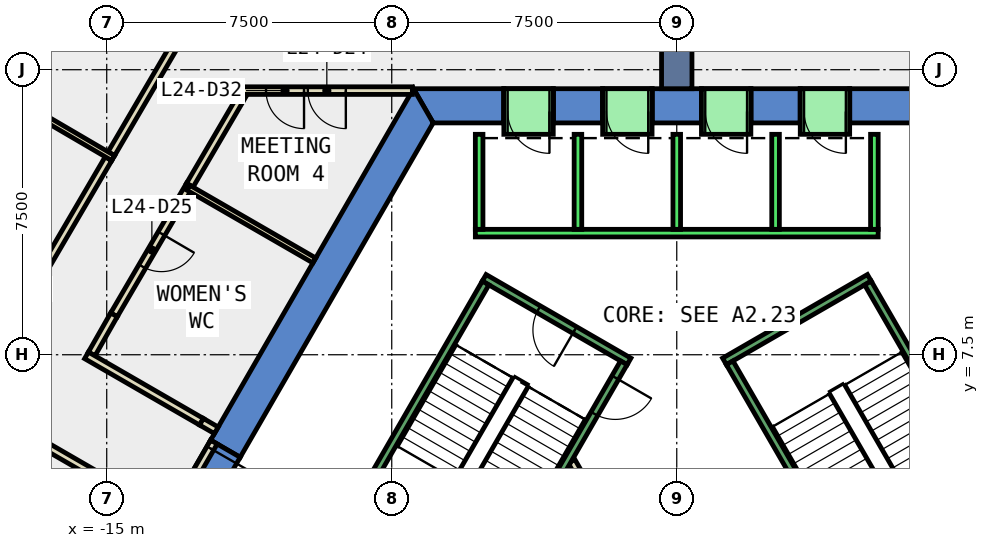
"""IFC4 building model, lengths in metres.
Left out: names, types, materials, properties, quantities, classifications, styles, units other than length and angle.
Written with IfcOpenShell. Run it as: python <this file> out.ifc"""

import sys

from ifc_helpers import new_model, si_unit, direction, frame, frame_2d, origin, place, context, subcontext, project, spatial, polyline, rectangle, outline, extrude, element, fill, save


model = new_model("IFC4")
c1 = context("Model", 3, precision=1e-05, world=origin(), true_north=direction((0.0, 1.0)))
c2 = subcontext(c1, "Body", "Model", "MODEL_VIEW")
j1 = project(units=[si_unit("LENGTHUNIT", "METRE"), si_unit("PLANEANGLEUNIT", "RADIAN")], contexts=[c1])
p1 = place(None, origin())
s1 = spatial("IfcSite", under=j1, at=p1, CompositionType="ELEMENT")
p2 = place(p1, origin())
s2 = spatial("IfcBuilding", under=s1, at=p2, CompositionType="ELEMENT")
p3 = place(p2, frame((0.0, 0.0, 111.8)))
s3 = spatial("IfcBuildingStorey", under=s2, at=p3, CompositionType="ELEMENT", Elevation=111.8)
p4 = place(p3, frame((0.0, 0.0, -0.4)))
e1 = element("IfcWall", 1, at=p4, inside=s3, PredefinedType="SHEAR", context=c2, shape_type="SweptSolid", body=[
    extrude(outline(polyline([(4.55, 14.5), (4.55, 13.6), (6.409, 13.6), (6.928, 14.5), (4.55, 14.5)])), origin(), (0.0, 0.0, 1.0), 4.2),
])
p5 = place(p3, frame((0.0, 0.0, -0.4)))
e2 = element("IfcWall", 2, at=p5, inside=s3, PredefinedType="SHEAR", context=c2, shape_type="SweptSolid", body=[
    extrude(outline(polyline([(1.95, 14.5), (1.95, 13.6), (3.25, 13.6), (3.25, 14.5), (1.95, 14.5)])), origin(), (0.0, 0.0, 1.0), 4.2),
])
p6 = place(p3, frame((0.0, 0.0, -0.4)))
e3 = element("IfcWall", 3, at=p6, inside=s3, PredefinedType="SHEAR", context=c2, shape_type="SweptSolid", body=[
    extrude(outline(polyline([(-0.65, 14.5), (-0.65, 13.6), (0.65, 13.6), (0.65, 14.5), (-0.65, 14.5)])), origin(), (0.0, 0.0, 1.0), 4.2),
])
p7 = place(p3, frame((0.0, 0.0, -0.4)))
e4 = element("IfcWall", 4, at=p7, inside=s3, PredefinedType="SHEAR", context=c2, shape_type="SweptSolid", body=[
    extrude(outline(polyline([(-3.25, 14.5), (-3.25, 13.6), (-1.95, 13.6), (-1.95, 14.5), (-3.25, 14.5)])), origin(), (0.0, 0.0, 1.0), 4.2),
])
p8 = place(p3, frame((0.0, 0.0, -0.4)))
e5 = element("IfcWall", 5, at=p8, inside=s3, PredefinedType="SHEAR", context=c2, shape_type="SweptSolid", body=[
    extrude(outline(polyline([(-4.55, 13.6), (-4.55, 14.5), (-6.928, 14.5), (-6.409, 13.6), (-4.55, 13.6)])), origin(), (0.0, 0.0, 1.0), 4.2),
])
p9 = place(p3, frame((0.0, 0.0, 3.6)))
e6 = element("IfcWall", 6, at=p9, inside=s3, PredefinedType="SHEAR", context=c2, shape_type="SweptSolid", body=[
    extrude(outline(polyline([(3.25, 14.5), (3.25, 13.6), (4.55, 13.6), (4.55, 14.5), (3.25, 14.5)])), origin(), (0.0, 0.0, 1.0), 0.2),
])
p10 = place(p3, frame((0.0, 0.0, 3.6)))
e7 = element("IfcWall", 7, at=p10, inside=s3, PredefinedType="SHEAR", context=c2, shape_type="SweptSolid", body=[
    extrude(outline(polyline([(0.65, 14.5), (0.65, 13.6), (1.95, 13.6), (1.95, 14.5), (0.65, 14.5)])), origin(), (0.0, 0.0, 1.0), 0.2),
])
p11 = place(p3, frame((0.0, 0.0, 3.6)))
e8 = element("IfcWall", 8, at=p11, inside=s3, PredefinedType="SHEAR", context=c2, shape_type="SweptSolid", body=[
    extrude(outline(polyline([(-1.95, 14.5), (-1.95, 13.6), (-0.65, 13.6), (-0.65, 14.5), (-1.95, 14.5)])), origin(), (0.0, 0.0, 1.0), 0.2),
])
p12 = place(p3, frame((0.0, 0.0, 3.6)))
e9 = element("IfcWall", 9, at=p12, inside=s3, PredefinedType="SHEAR", context=c2, shape_type="SweptSolid", body=[
    extrude(outline(polyline([(-4.55, 14.5), (-4.55, 13.6), (-3.25, 13.6), (-3.25, 14.5), (-4.55, 14.5)])), origin(), (0.0, 0.0, 1.0), 0.2),
])
p13 = place(p3, frame((0.0, 0.0, -0.4)))
e10 = element("IfcWall", 10, at=p13, inside=s3, PredefinedType="SHEAR", context=c2, shape_type="SweptSolid", body=[
    extrude(outline(polyline([(-12.267, 5.252), (-11.488, 4.802), (-6.409, 13.6), (-6.928, 14.5), (-12.267, 5.252)])), origin(), (0.0, 0.0, 1.0), 4.2),
])
p14 = place(p3, frame((0.0, 0.0, 3.6)))
e11 = element("IfcWall", 11, at=p14, inside=s3, PredefinedType="SHEAR", context=c2, shape_type="SweptSolid", body=[
    extrude(outline(polyline([(-13.267, 3.52), (-12.488, 3.07), (-11.488, 4.802), (-12.267, 5.252), (-13.267, 3.52)])), origin(), (0.0, 0.0, 1.0), 0.2),
])
p15 = place(p3, frame((0.0, 14.5, -0.4), z_axis=(0.0, 0.0, 1.0), x_axis=(0.0, 1.0, 0.0)))
e12 = element("IfcWall", 12, at=p15, inside=s3, PredefinedType="SHEAR", context=c2, shape_type="SweptSolid", body=[
    extrude(rectangle(XDim=9.0, YDim=0.8, at=frame_2d((4.5, 0.0))), origin(), (0.0, 0.0, 1.0), 4.2),
])
p16 = place(p3, frame((-11.409, 14.364, 0.0), z_axis=(0.0, 0.0, 1.0), x_axis=(-0.504846343003, -0.863209227219, 0.0)))
e13 = element("IfcWall", 13, at=p16, inside=s3, PredefinedType="PARTITIONING", context=c2, shape_type="SweptSolid", body=[
    extrude(rectangle(XDim=2.785, YDim=0.2, at=frame_2d((1.393, 0.0))), origin(), (0.0, 0.0, 1.0), 3.8),
])
p17 = place(p3, frame((-12.815, 11.96, 0.0), z_axis=(0.0, 0.0, 1.0), x_axis=(-0.5048198861, -0.863224699946, 0.0)))
e14 = element("IfcWall", 14, at=p17, inside=s3, PredefinedType="PARTITIONING", context=c2, shape_type="SweptSolid", body=[
    extrude(rectangle(XDim=3.95, YDim=0.2, at=frame_2d((1.975, 0.0))), origin(), (0.0, 0.0, 1.0), 3.8),
])
p18 = place(p17, frame((1.475, 0.0, 0.0)))
e15 = element("IfcOpeningElement", 15, at=p18, cuts=e14, PredefinedType="OPENING", context=c2, shape_type="SweptSolid", body=[
    extrude(rectangle(XDim=1.0, YDim=2.1, at=frame_2d((0.5, 1.05))), frame((0.0, 0.11, 0.0), z_axis=(0.0, -1.0, 0.0), x_axis=(1.0, 0.0, 0.0)), (0.0, 0.0, 1.0), 0.22),
])
p19 = place(p3, frame((-14.809, 8.55, 0.0), z_axis=(0.0, 0.0, 1.0), x_axis=(-0.495074026382, -0.868850797549, 0.0)))
e16 = element("IfcWall", 16, at=p19, inside=s3, PredefinedType="PARTITIONING", context=c2, shape_type="SweptSolid", body=[
    extrude(rectangle(XDim=1.186, YDim=0.2, at=frame_2d((0.593, 0.0))), origin(), (0.0, 0.0, 1.0), 3.8),
])
p20 = place(p3, frame((-15.532, 7.484, 0.0), z_axis=(0.0, 0.0, 1.0), x_axis=(0.866045954906, -0.499964402723, 0.0)))
e17 = element("IfcWall", 17, at=p20, inside=s3, PredefinedType="PARTITIONING", context=c2, shape_type="SweptSolid", body=[
    extrude(rectangle(XDim=3.494, YDim=0.2, at=frame_2d((1.747, 0.0))), origin(), (0.0, 0.0, 1.0), 3.8),
])
p21 = place(p3, frame((-14.879, 12.789, 0.0), z_axis=(0.0, 0.0, 1.0), x_axis=(0.504763220102, 0.863257836126, 0.0)))
e18 = element("IfcWall", 18, at=p21, inside=s3, PredefinedType="PARTITIONING", context=c2, shape_type="SweptSolid", body=[
    extrude(rectangle(XDim=3.487, YDim=0.2, at=frame_2d((1.743, 0.0))), origin(), (0.0, 0.0, 1.0), 3.8),
])
p22 = place(p3, frame((-16.714, 9.65, 0.0), z_axis=(0.0, 0.0, 1.0), x_axis=(0.504885284202, 0.863186451351, 0.0)))
e19 = element("IfcWall", 19, at=p22, inside=s3, PredefinedType="PARTITIONING", context=c2, shape_type="SweptSolid", body=[
    extrude(rectangle(XDim=3.486, YDim=0.2, at=frame_2d((1.743, 0.0))), origin(), (0.0, 0.0, 1.0), 3.8),
])
p23 = place(p3, frame((-9.537, 9.981, 0.0), z_axis=(0.0, 0.0, 1.0), x_axis=(-0.866068787954, 0.499924848885, 0.0)))
e20 = element("IfcWall", 20, at=p23, inside=s3, PredefinedType="PARTITIONING", context=c2, shape_type="SweptSolid", body=[
    extrude(rectangle(XDim=3.829, YDim=0.15, at=frame_2d((1.914, 0.0))), origin(), (0.0, 0.0, 1.0), 3.8),
])
p24 = place(p3, frame((-6.957, 14.45, 0.0), z_axis=(0.0, 0.0, 1.0), x_axis=(-1.0, 0.0, 0.0)))
e21 = element("IfcWall", 21, at=p24, inside=s3, PredefinedType="PARTITIONING", context=c2, shape_type="SweptSolid", body=[
    extrude(rectangle(XDim=4.502, YDim=0.2, at=frame_2d((2.251, 0.0))), origin(), (0.0, 0.0, 1.0), 3.8),
])
p25 = place(p24, frame((1.751, 0.0, 0.0)))
e22 = element("IfcOpeningElement", 22, at=p25, cuts=e21, PredefinedType="OPENING", context=c2, shape_type="SweptSolid", body=[
    extrude(rectangle(XDim=1.0, YDim=2.1, at=frame_2d((0.5, 1.05))), frame((0.0, 0.11, 0.0), z_axis=(0.0, -1.0, 0.0), x_axis=(1.0, 0.0, 0.0)), (0.0, 0.0, 1.0), 0.22),
])
p26 = place(p24, frame((2.851, 0.0, 0.0)))
e23 = element("IfcOpeningElement", 23, at=p26, cuts=e21, PredefinedType="OPENING", context=c2, shape_type="SweptSolid", body=[
    extrude(rectangle(XDim=1.0, YDim=2.1, at=frame_2d((0.5, 1.05))), frame((0.0, 0.11, 0.0), z_axis=(0.0, -1.0, 0.0), x_axis=(1.0, 0.0, 0.0)), (0.0, 0.0, 1.0), 0.22),
])
p27 = place(p3, frame((-2.771, 4.7, 0.0), z_axis=(0.0, 0.0, 1.0), x_axis=(0.499969479948, -0.866043023828, 0.0)))
e24 = element("IfcWall", 24, at=p27, inside=s3, PredefinedType="PARTITIONING", context=c2, shape_type="SweptSolid", body=[
    extrude(rectangle(XDim=4.99, YDim=0.2, at=frame_2d((2.495, 0.0))), origin(), (0.0, 0.0, 1.0), 3.8),
])
p28 = place(p27, frame((1.945, 0.0, 0.0)))
e25 = element("IfcOpeningElement", 25, at=p28, cuts=e24, PredefinedType="OPENING", context=c2, shape_type="SweptSolid", body=[
    extrude(rectangle(XDim=1.0, YDim=2.1, at=frame_2d((0.5, 1.05))), frame((0.0, 0.11, 0.0), z_axis=(0.0, -1.0, 0.0), x_axis=(1.0, 0.0, 0.0)), (0.0, 0.0, 1.0), 0.22),
])
p29 = place(p3, frame((-14.83, 12.674, 0.0), z_axis=(0.0, 0.0, 1.0), x_axis=(-0.863237916953, 0.504797284794, 0.0)))
e26 = element("IfcWall", 26, at=p29, inside=s3, PredefinedType="PARTITIONING", context=c2, shape_type="SweptSolid", body=[
    extrude(rectangle(XDim=7.7, YDim=0.15, at=frame_2d((3.85, 0.0))), origin(), (0.0, 0.0, 1.0), 3.8),
])
p30 = place(p3, frame((-12.18, 5.202, 0.0), z_axis=(0.0, 0.0, 1.0), x_axis=(-0.50002537861, -0.866010750942, 0.0)))
e27 = element("IfcWall", 27, at=p30, inside=s3, PredefinedType="PARTITIONING", context=c2, shape_type="SweptSolid", body=[
    extrude(rectangle(XDim=2.0, YDim=0.2, at=frame_2d((1.0, 0.0))), origin(), (0.0, 0.0, 1.0), 2.4),
])
p31 = place(p30, frame((0.19, 0.0, 0.0)))
e28 = element("IfcOpeningElement", 28, at=p31, cuts=e27, PredefinedType="OPENING", context=c2, shape_type="SweptSolid", body=[
    extrude(rectangle(XDim=1.8, YDim=2.1, at=frame_2d((0.9, 1.05))), frame((0.0, 0.11, 0.0), z_axis=(0.0, -1.0, 0.0), x_axis=(1.0, 0.0, 0.0)), (0.0, 0.0, 1.0), 0.22),
])
p32 = place(p3, frame((-12.506, 5.737, 0.0), z_axis=(0.0, 0.0, 1.0), x_axis=(0.865624510465, -0.500693725627, 0.0)))
e29 = element("IfcWall", 29, at=p32, inside=s3, PredefinedType="PARTITIONING", context=c2, shape_type="SweptSolid", body=[
    extrude(rectangle(XDim=0.449, YDim=0.2, at=frame_2d((0.225, 0.0))), origin(), (0.0, 0.0, 1.0), 2.4),
])
p33 = place(p3, frame((-13.807, 3.485, 0.0), z_axis=(0.0, 0.0, 1.0), x_axis=(-0.865984597717, 0.500070671522, 0.0)))
e30 = element("IfcWall", 30, at=p33, inside=s3, PredefinedType="PARTITIONING", context=c2, shape_type="SweptSolid", body=[
    extrude(rectangle(XDim=3.479, YDim=0.2, at=frame_2d((1.74, 0.0))), origin(), (0.0, 0.0, 1.0), 3.8),
])
p34 = place(p3, frame((5.3, 10.7, 0.0), z_axis=(0.0, 0.0, 1.0), x_axis=(-1.0, 0.0, 0.0)))
e31 = element("IfcWall", 31, at=p34, inside=s3, PredefinedType="STANDARD", context=c2, shape_type="SweptSolid", body=[
    extrude(rectangle(XDim=10.6, YDim=0.2, at=frame_2d((5.3, 0.0))), origin(), (0.0, 0.0, 1.0), 3.8),
])
for number, where, z_axis, x_axis in (
    (32, (5.2, 10.8, 0.0), (0.0, 0.0, 1.0), (0.0, 1.0, 0.0)),
    (33, (2.6, 10.8, 0.0), (0.0, 0.0, 1.0), (0.0, 1.0, 0.0)),
    (34, (0.0, 10.8, 0.0), (0.0, 0.0, 1.0), (0.0, 1.0, 0.0)),
    (35, (-2.6, 10.8, 0.0), (0.0, 0.0, 1.0), (0.0, 1.0, 0.0)),
    (36, (-5.2, 10.8, 0.0), (0.0, 0.0, 1.0), (0.0, 1.0, 0.0)),
):
    element("IfcWall", number, at=place(p3, frame(where, z_axis=z_axis, x_axis=x_axis)), inside=s3, PredefinedType="STANDARD", context=c2, shape_type="SweptSolid", body=[
        extrude(rectangle(XDim=2.5, YDim=0.2, at=frame_2d((1.25, 0.0))), origin(), (0.0, 0.0, 1.0), 3.8),
    ])
p35 = place(p3, frame((4.55, 13.9, 0.0), z_axis=(0.0, 0.0, 1.0), x_axis=(-1.0, 0.0, 0.0)))
e37 = element("IfcWall", 37, at=p35, inside=s3, PredefinedType="STANDARD", context=c2, shape_type="SweptSolid", body=[
    extrude(rectangle(XDim=1.3, YDim=1.2, at=frame_2d((0.65, 0.0))), origin(), (0.0, 0.0, 1.0), 2.4),
])
p36 = place(p35, frame((0.1, 0.0, 0.0)))
e38 = element("IfcOpeningElement", 38, at=p36, cuts=e37, PredefinedType="OPENING", context=c2, shape_type="SweptSolid", body=[
    extrude(rectangle(XDim=1.1, YDim=2.3, at=frame_2d((0.55, 1.15))), frame((0.0, 0.61, 0.0), z_axis=(0.0, -1.0, 0.0), x_axis=(1.0, 0.0, 0.0)), (0.0, 0.0, 1.0), 1.22),
])
p37 = place(p3, frame((1.95, 13.9, 0.0), z_axis=(0.0, 0.0, 1.0), x_axis=(-1.0, 0.0, 0.0)))
e39 = element("IfcWall", 39, at=p37, inside=s3, PredefinedType="STANDARD", context=c2, shape_type="SweptSolid", body=[
    extrude(rectangle(XDim=1.3, YDim=1.2, at=frame_2d((0.65, 0.0))), origin(), (0.0, 0.0, 1.0), 2.4),
])
p38 = place(p37, frame((0.1, 0.0, 0.0)))
e40 = element("IfcOpeningElement", 40, at=p38, cuts=e39, PredefinedType="OPENING", context=c2, shape_type="SweptSolid", body=[
    extrude(rectangle(XDim=1.1, YDim=2.3, at=frame_2d((0.55, 1.15))), frame((0.0, 0.61, 0.0), z_axis=(0.0, -1.0, 0.0), x_axis=(1.0, 0.0, 0.0)), (0.0, 0.0, 1.0), 1.22),
])
p39 = place(p3, frame((-0.65, 13.9, 0.0), z_axis=(0.0, 0.0, 1.0), x_axis=(-1.0, 0.0, 0.0)))
e41 = element("IfcWall", 41, at=p39, inside=s3, PredefinedType="STANDARD", context=c2, shape_type="SweptSolid", body=[
    extrude(rectangle(XDim=1.3, YDim=1.2, at=frame_2d((0.65, 0.0))), origin(), (0.0, 0.0, 1.0), 2.4),
])
p40 = place(p39, frame((0.1, 0.0, 0.0)))
e42 = element("IfcOpeningElement", 42, at=p40, cuts=e41, PredefinedType="OPENING", context=c2, shape_type="SweptSolid", body=[
    extrude(rectangle(XDim=1.1, YDim=2.3, at=frame_2d((0.55, 1.15))), frame((0.0, 0.61, 0.0), z_axis=(0.0, -1.0, 0.0), x_axis=(1.0, 0.0, 0.0)), (0.0, 0.0, 1.0), 1.22),
])
p41 = place(p3, frame((-3.25, 13.9, 0.0), z_axis=(0.0, 0.0, 1.0), x_axis=(-1.0, 0.0, 0.0)))
e43 = element("IfcWall", 43, at=p41, inside=s3, PredefinedType="STANDARD", context=c2, shape_type="SweptSolid", body=[
    extrude(rectangle(XDim=1.3, YDim=1.2, at=frame_2d((0.65, 0.0))), origin(), (0.0, 0.0, 1.0), 2.4),
])
p42 = place(p41, frame((0.1, 0.0, 0.0)))
e44 = element("IfcOpeningElement", 44, at=p42, cuts=e43, PredefinedType="OPENING", context=c2, shape_type="SweptSolid", body=[
    extrude(rectangle(XDim=1.1, YDim=2.3, at=frame_2d((0.55, 1.15))), frame((0.0, 0.61, 0.0), z_axis=(0.0, -1.0, 0.0), x_axis=(1.0, 0.0, 0.0)), (0.0, 0.0, 1.0), 1.22),
])
p43 = place(p3, frame((1.256, 7.324, 0.0), z_axis=(0.0, 0.0, 1.0), x_axis=(0.866046073146, 0.499964197906, 0.0)))
e45 = element("IfcWall", 45, at=p43, inside=s3, PredefinedType="STANDARD", context=c2, shape_type="SweptSolid", body=[
    extrude(rectangle(XDim=4.4, YDim=0.2, at=frame_2d((2.2, 0.0))), origin(), (0.0, 0.0, 1.0), 3.8),
])
p44 = place(p3, frame((4.843, 1.312, 0.0), z_axis=(0.0, 0.0, 1.0), x_axis=(-0.499963383562, 0.866046543262, 0.0)))
e46 = element("IfcWall", 46, at=p44, inside=s3, PredefinedType="STANDARD", context=c2, shape_type="SweptSolid", body=[
    extrude(rectangle(XDim=6.9, YDim=0.2, at=frame_2d((3.45, 0.0))), origin(), (0.0, 0.0, 1.0), 3.8),
])
p45 = place(p44, frame((0.45, 0.0, 0.0)))
e47 = element("IfcOpeningElement", 47, at=p45, cuts=e46, PredefinedType="OPENING", context=c2, shape_type="SweptSolid", body=[
    extrude(rectangle(XDim=1.1, YDim=2.2, at=frame_2d((0.55, 1.1))), frame((0.0, 0.11, 0.0), z_axis=(0.0, -1.0, 0.0), x_axis=(1.0, 0.0, 0.0)), (0.0, 0.0, 1.0), 0.22),
])
p46 = place(p3, frame((8.48, 3.412, 0.0), z_axis=(0.0, 0.0, 1.0), x_axis=(-0.499978703459, 0.866037698999, 0.0)))
e48 = element("IfcWall", 48, at=p46, inside=s3, PredefinedType="STANDARD", context=c2, shape_type="SweptSolid", body=[
    extrude(rectangle(XDim=6.9, YDim=0.2, at=frame_2d((3.45, 0.0))), origin(), (0.0, 0.0, 1.0), 3.8),
])
p47 = place(p3, frame((-1.256, 7.324, 0.0), z_axis=(0.0, 0.0, 1.0), x_axis=(-0.866046073146, 0.499964197906, 0.0)))
e49 = element("IfcWall", 49, at=p47, inside=s3, PredefinedType="STANDARD", context=c2, shape_type="SweptSolid", body=[
    extrude(rectangle(XDim=4.4, YDim=0.2, at=frame_2d((2.2, 0.0))), origin(), (0.0, 0.0, 1.0), 3.8),
])
p48 = place(p47, frame((1.65, 0.0, 0.0)))
e50 = element("IfcOpeningElement", 50, at=p48, cuts=e49, PredefinedType="OPENING", context=c2, shape_type="SweptSolid", body=[
    extrude(rectangle(XDim=1.1, YDim=2.2, at=frame_2d((0.55, 1.1))), frame((0.0, 0.11, 0.0), z_axis=(0.0, -1.0, 0.0), x_axis=(1.0, 0.0, 0.0)), (0.0, 0.0, 1.0), 0.22),
])
p49 = place(p3, frame((-1.393, 7.288, 0.0), z_axis=(0.0, 0.0, 1.0), x_axis=(-0.499963383562, -0.866046543262, 0.0)))
e51 = element("IfcWall", 51, at=p49, inside=s3, PredefinedType="STANDARD", context=c2, shape_type="SweptSolid", body=[
    extrude(rectangle(XDim=6.9, YDim=0.2, at=frame_2d((3.45, 0.0))), origin(), (0.0, 0.0, 1.0), 3.8),
])
p50 = place(p49, frame((0.45, 0.0, 0.0)))
e52 = element("IfcOpeningElement", 52, at=p50, cuts=e51, PredefinedType="OPENING", context=c2, shape_type="SweptSolid", body=[
    extrude(rectangle(XDim=1.1, YDim=2.2, at=frame_2d((0.55, 1.1))), frame((0.0, 0.11, 0.0), z_axis=(0.0, -1.0, 0.0), x_axis=(1.0, 0.0, 0.0)), (0.0, 0.0, 1.0), 0.22),
])
p51 = place(p3, frame((-5.03, 9.388, 0.0), z_axis=(0.0, 0.0, 1.0), x_axis=(-0.499978703459, -0.866037698999, 0.0)))
e53 = element("IfcWall", 53, at=p51, inside=s3, PredefinedType="STANDARD", context=c2, shape_type="SweptSolid", body=[
    extrude(rectangle(XDim=6.9, YDim=0.2, at=frame_2d((3.45, 0.0))), origin(), (0.0, 0.0, 1.0), 3.8),
])
p52 = place(p25, origin())
e54 = element("IfcDoor", 54, at=p52, inside=s3, OperationType="SINGLE_SWING_LEFT", PredefinedType="DOOR", context=c2, shape_type="SweptSolid", body=[
    extrude(rectangle(XDim=1.0, YDim=2.1, at=frame_2d((0.5, 1.05))), frame((0.0, 0.025, 0.0), z_axis=(0.0, -1.0, 0.0), x_axis=(1.0, 0.0, 0.0)), (0.0, 0.0, 1.0), 0.05),
])
fill(e22, e54)
p53 = place(p18, origin())
e55 = element("IfcDoor", 55, at=p53, inside=s3, OperationType="SINGLE_SWING_RIGHT", PredefinedType="DOOR", context=c2, shape_type="SweptSolid", body=[
    extrude(rectangle(XDim=1.0, YDim=2.1, at=frame_2d((0.5, 1.05))), frame((0.0, 0.025, 0.0), z_axis=(0.0, -1.0, 0.0), x_axis=(1.0, 0.0, 0.0)), (0.0, 0.0, 1.0), 0.05),
])
fill(e15, e55)
p54 = place(p26, origin())
e56 = element("IfcDoor", 56, at=p54, inside=s3, OperationType="SINGLE_SWING_RIGHT", PredefinedType="DOOR", context=c2, shape_type="SweptSolid", body=[
    extrude(rectangle(XDim=1.0, YDim=2.1, at=frame_2d((0.5, 1.05))), frame((0.0, 0.025, 0.0), z_axis=(0.0, -1.0, 0.0), x_axis=(1.0, 0.0, 0.0)), (0.0, 0.0, 1.0), 0.05),
])
fill(e23, e56)
p55 = place(p31, origin())
e57 = element("IfcDoor", 57, at=p55, inside=s3, OperationType="DOUBLE_DOOR_SINGLE_SWING", PredefinedType="DOOR", context=c2, shape_type="SweptSolid", body=[
    extrude(rectangle(XDim=1.8, YDim=2.1, at=frame_2d((0.9, 1.05))), frame((0.0, 0.025, 0.0), z_axis=(0.0, -1.0, 0.0), x_axis=(1.0, 0.0, 0.0)), (0.0, 0.0, 1.0), 0.05),
])
fill(e28, e57)
p56 = place(p36, origin())
e58 = element("IfcDoor", 58, at=p56, inside=s3, OperationType="SLIDING_TO_LEFT", PredefinedType="DOOR", context=c2, shape_type="SweptSolid", body=[
    extrude(rectangle(XDim=1.1, YDim=2.3, at=frame_2d((0.55, 1.15))), frame((0.0, 0.025, 0.0), z_axis=(0.0, -1.0, 0.0), x_axis=(1.0, 0.0, 0.0)), (0.0, 0.0, 1.0), 0.05),
])
fill(e38, e58)
p57 = place(p38, origin())
e59 = element("IfcDoor", 59, at=p57, inside=s3, OperationType="SLIDING_TO_LEFT", PredefinedType="DOOR", context=c2, shape_type="SweptSolid", body=[
    extrude(rectangle(XDim=1.1, YDim=2.3, at=frame_2d((0.55, 1.15))), frame((0.0, 0.025, 0.0), z_axis=(0.0, -1.0, 0.0), x_axis=(1.0, 0.0, 0.0)), (0.0, 0.0, 1.0), 0.05),
])
fill(e40, e59)
p58 = place(p40, origin())
e60 = element("IfcDoor", 60, at=p58, inside=s3, OperationType="SLIDING_TO_LEFT", PredefinedType="DOOR", context=c2, shape_type="SweptSolid", body=[
    extrude(rectangle(XDim=1.1, YDim=2.3, at=frame_2d((0.55, 1.15))), frame((0.0, 0.025, 0.0), z_axis=(0.0, -1.0, 0.0), x_axis=(1.0, 0.0, 0.0)), (0.0, 0.0, 1.0), 0.05),
])
fill(e42, e60)
p59 = place(p42, origin())
e61 = element("IfcDoor", 61, at=p59, inside=s3, OperationType="SLIDING_TO_LEFT", PredefinedType="DOOR", context=c2, shape_type="SweptSolid", body=[
    extrude(rectangle(XDim=1.1, YDim=2.3, at=frame_2d((0.55, 1.15))), frame((0.0, 0.025, 0.0), z_axis=(0.0, -1.0, 0.0), x_axis=(1.0, 0.0, 0.0)), (0.0, 0.0, 1.0), 0.05),
])
fill(e44, e61)
p60 = place(p50, origin())
e62 = element("IfcDoor", 62, at=p60, inside=s3, OperationType="SINGLE_SWING_LEFT", PredefinedType="DOOR", context=c2, shape_type="SweptSolid", body=[
    extrude(rectangle(XDim=1.1, YDim=2.2, at=frame_2d((0.55, 1.1))), frame((0.0, 0.025, 0.0), z_axis=(0.0, -1.0, 0.0), x_axis=(1.0, 0.0, 0.0)), (0.0, 0.0, 1.0), 0.05),
])
fill(e52, e62)
p61 = place(p48, origin())
e63 = element("IfcDoor", 63, at=p61, inside=s3, OperationType="SINGLE_SWING_LEFT", PredefinedType="DOOR", context=c2, shape_type="SweptSolid", body=[
    extrude(rectangle(XDim=1.1, YDim=2.2, at=frame_2d((0.55, 1.1))), frame((0.0, 0.025, 0.0), z_axis=(0.0, -1.0, 0.0), x_axis=(1.0, 0.0, 0.0)), (0.0, 0.0, 1.0), 0.05),
])
fill(e50, e63)
save(model, sys.argv[1])
